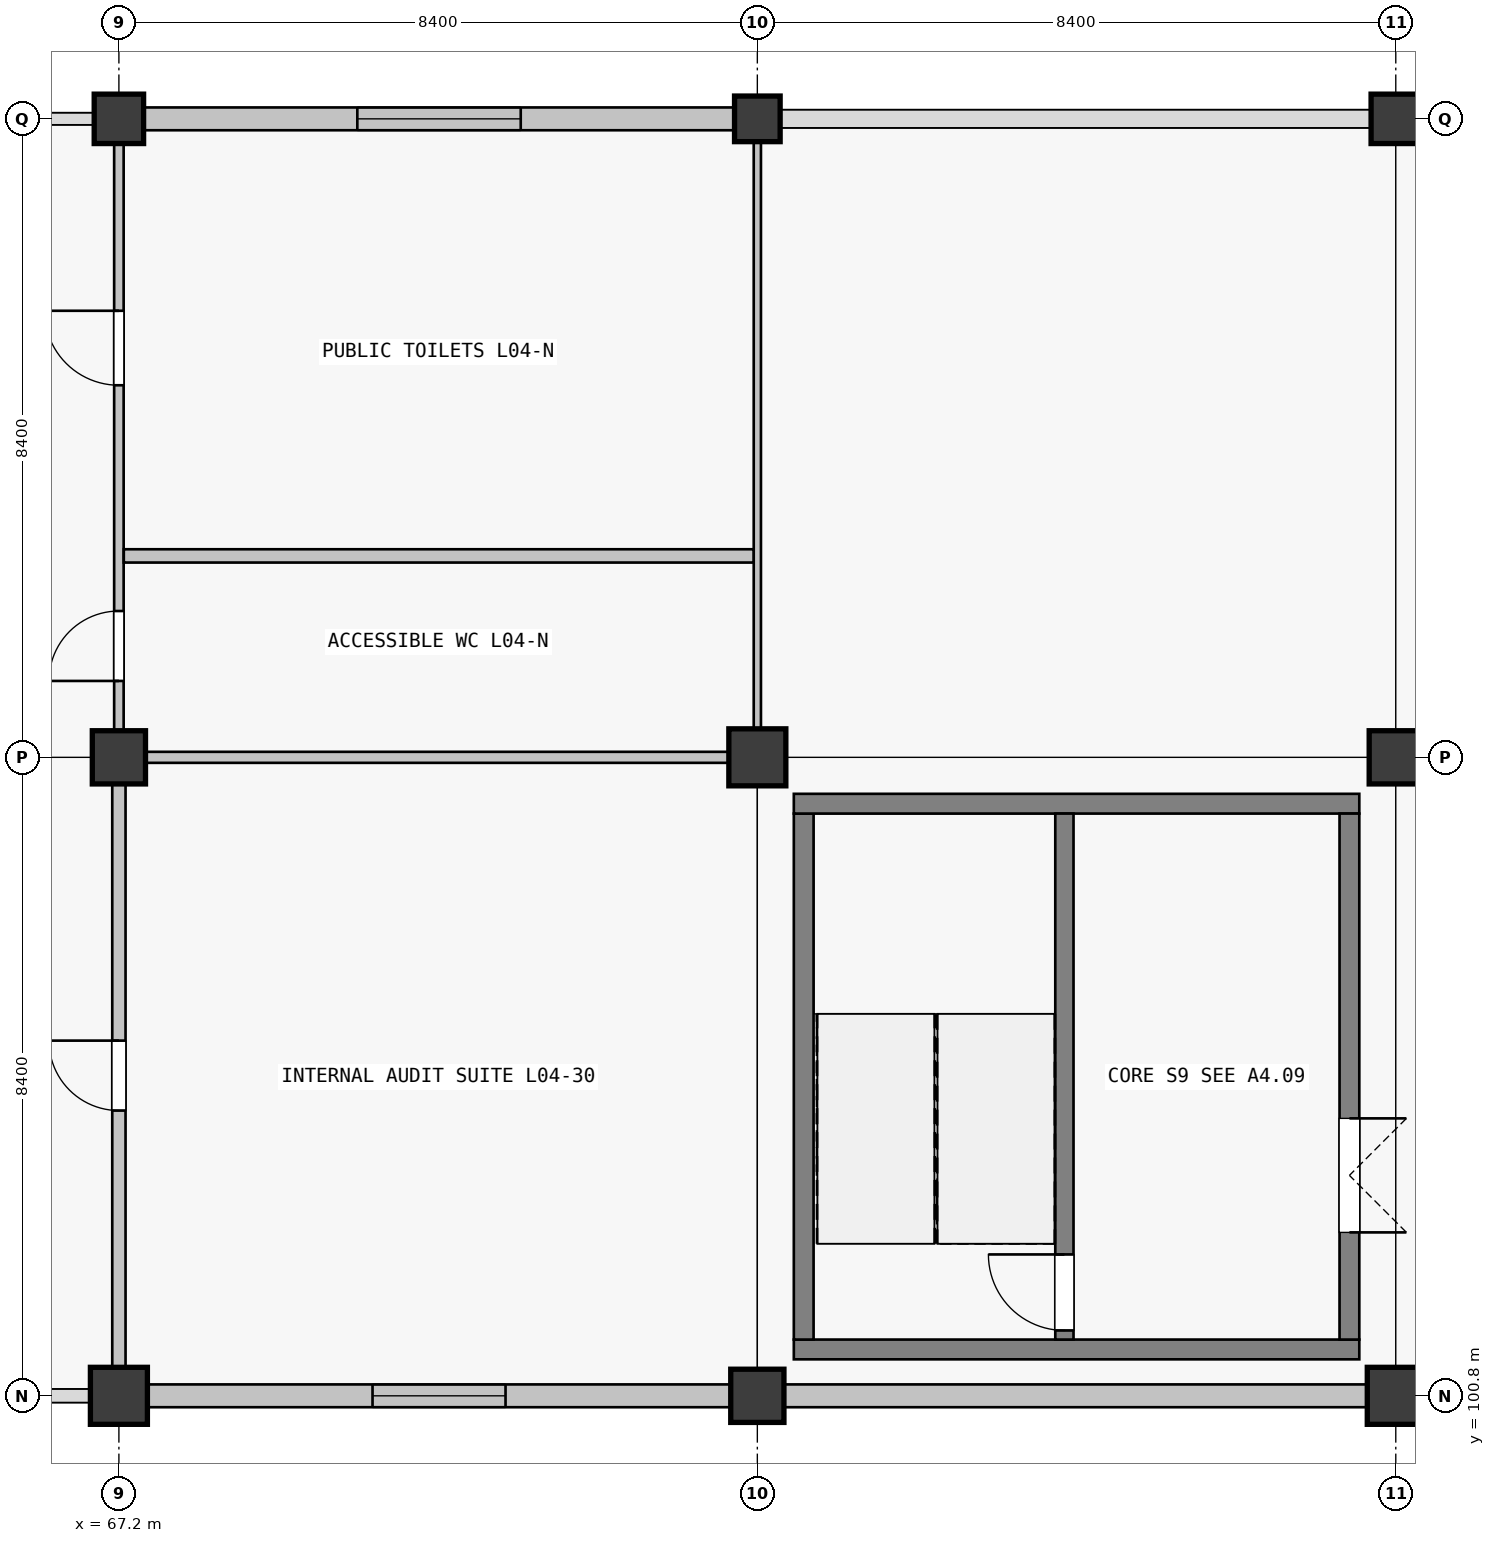
"""IFC4 building model, lengths in metres.
Left out: names, types, materials, properties, quantities, classifications, styles, units other than length and angle.
Written with IfcOpenShell. Run it as: python <this file> out.ifc"""

import sys

from ifc_helpers import new_model, si_unit, direction, frame, frame_2d, origin, origin_2d, place, context, subcontext, project, spatial, rectangle, extrude, element, fill, save


model = new_model("IFC4")
c1 = context("Model", 3, precision=1e-05, world=origin(), true_north=direction((0.0, 1.0)))
c2 = subcontext(c1, "Body", "Model", "MODEL_VIEW")
j1 = project(units=[si_unit("LENGTHUNIT", "METRE"), si_unit("PLANEANGLEUNIT", "RADIAN")], contexts=[c1])
p1 = place(None, origin())
s1 = spatial("IfcSite", under=j1, at=p1, CompositionType="ELEMENT")
p2 = place(p1, origin())
s2 = spatial("IfcBuilding", under=s1, at=p2, CompositionType="ELEMENT")
p3 = place(p2, frame((0.0, 0.0, 19.08)))
s3 = spatial("IfcBuildingStorey", under=s2, at=p3, CompositionType="ELEMENT", Elevation=19.08)
p4 = place(p3, frame((67.2, 100.8, 0.0), z_axis=(0.0, 0.0, 1.0), x_axis=(1.0, 0.0, 0.0)))
e1 = element("IfcColumn", 1, at=p4, inside=s3, PredefinedType="COLUMN", context=c2, shape_type="SweptSolid", body=[
    extrude(rectangle(XDim=0.75, YDim=0.75, at=origin_2d()), origin(), (0.0, 0.0, 1.0), 4.32),
])
p5 = place(p3, frame((67.2, 109.2, 0.0), z_axis=(0.0, 0.0, 1.0), x_axis=(1.0, 0.0, 0.0)))
e2 = element("IfcColumn", 2, at=p5, inside=s3, PredefinedType="COLUMN", context=c2, shape_type="SweptSolid", body=[
    extrude(rectangle(XDim=0.7, YDim=0.7, at=origin_2d()), origin(), (0.0, 0.0, 1.0), 4.32),
])
p6 = place(p3, frame((67.2, 117.6, 0.0), z_axis=(0.0, 0.0, 1.0), x_axis=(1.0, 0.0, 0.0)))
e3 = element("IfcColumn", 3, at=p6, inside=s3, PredefinedType="COLUMN", context=c2, shape_type="SweptSolid", body=[
    extrude(rectangle(XDim=0.65, YDim=0.65, at=origin_2d()), origin(), (0.0, 0.0, 1.0), 4.32),
])
p7 = place(p3, frame((75.6, 100.8, 0.0), z_axis=(0.0, 0.0, 1.0), x_axis=(1.0, 0.0, 0.0)))
e4 = element("IfcColumn", 4, at=p7, inside=s3, PredefinedType="COLUMN", context=c2, shape_type="SweptSolid", body=[
    extrude(rectangle(XDim=0.7, YDim=0.7, at=origin_2d()), origin(), (0.0, 0.0, 1.0), 4.32),
])
p8 = place(p3, frame((75.6, 109.2, 0.0), z_axis=(0.0, 0.0, 1.0), x_axis=(1.0, 0.0, 0.0)))
e5 = element("IfcColumn", 5, at=p8, inside=s3, PredefinedType="COLUMN", context=c2, shape_type="SweptSolid", body=[
    extrude(rectangle(XDim=0.75, YDim=0.75, at=origin_2d()), origin(), (0.0, 0.0, 1.0), 4.32),
])
p9 = place(p3, frame((75.6, 117.6, 0.0), z_axis=(0.0, 0.0, 1.0), x_axis=(1.0, 0.0, 0.0)))
e6 = element("IfcColumn", 6, at=p9, inside=s3, PredefinedType="COLUMN", context=c2, shape_type="SweptSolid", body=[
    extrude(rectangle(XDim=0.6, YDim=0.6, at=origin_2d()), origin(), (0.0, 0.0, 1.0), 4.32),
])
p10 = place(p3, frame((84.0, 100.8, 0.0), z_axis=(0.0, 0.0, 1.0), x_axis=(1.0, 0.0, 0.0)))
e7 = element("IfcColumn", 7, at=p10, inside=s3, PredefinedType="COLUMN", context=c2, shape_type="SweptSolid", body=[
    extrude(rectangle(XDim=0.75, YDim=0.75, at=origin_2d()), origin(), (0.0, 0.0, 1.0), 4.32),
])
p11 = place(p3, frame((84.0, 109.2, 0.0), z_axis=(0.0, 0.0, 1.0), x_axis=(1.0, 0.0, 0.0)))
e8 = element("IfcColumn", 8, at=p11, inside=s3, PredefinedType="COLUMN", context=c2, shape_type="SweptSolid", body=[
    extrude(rectangle(XDim=0.7, YDim=0.7, at=origin_2d()), origin(), (0.0, 0.0, 1.0), 4.32),
])
p12 = place(p3, frame((84.0, 117.6, 0.0), z_axis=(0.0, 0.0, 1.0), x_axis=(1.0, 0.0, 0.0)))
e9 = element("IfcColumn", 9, at=p12, inside=s3, PredefinedType="COLUMN", context=c2, shape_type="SweptSolid", body=[
    extrude(rectangle(XDim=0.65, YDim=0.65, at=origin_2d()), origin(), (0.0, 0.0, 1.0), 4.32),
])
p13 = place(p3, frame((75.249, 100.8, 0.0), z_axis=(0.0, 0.0, 1.0), x_axis=(-1.0, 0.0, 0.0)))
e10 = element("IfcWall", 10, at=p13, inside=s3, PredefinedType="SOLIDWALL", context=c2, shape_type="SweptSolid", body=[
    extrude(rectangle(XDim=7.673, YDim=0.3, at=frame_2d((3.836, 0.0))), origin(), (0.0, 0.0, 1.0), 3.37),
])
p14 = place(p13, frame((2.962, 0.0, 0.9)))
e11 = element("IfcOpeningElement", 11, at=p14, cuts=e10, PredefinedType="OPENING", context=c2, shape_type="SweptSolid", body=[
    extrude(rectangle(XDim=1.75, YDim=1.95, at=frame_2d((0.875, 0.975))), frame((0.0, 0.15, 0.0), z_axis=(0.0, -1.0, 0.0), x_axis=(1.0, 0.0, 0.0)), (0.0, 0.0, 1.0), 0.3),
])
p15 = place(p3, frame((67.526, 117.6, 0.0), z_axis=(0.0, 0.0, 1.0), x_axis=(1.0, 0.0, 0.0)))
e12 = element("IfcWall", 12, at=p15, inside=s3, PredefinedType="SOLIDWALL", context=c2, shape_type="SweptSolid", body=[
    extrude(rectangle(XDim=7.773, YDim=0.3, at=frame_2d((3.887, 0.0))), origin(), (0.0, 0.0, 1.0), 3.37),
])
p16 = place(p15, frame((2.811, 0.0, 0.9)))
e13 = element("IfcOpeningElement", 13, at=p16, cuts=e12, PredefinedType="OPENING", context=c2, shape_type="SweptSolid", body=[
    extrude(rectangle(XDim=2.15, YDim=1.95, at=frame_2d((1.075, 0.975))), frame((0.0, 0.15, 0.0), z_axis=(0.0, -1.0, 0.0), x_axis=(1.0, 0.0, 0.0)), (0.0, 0.0, 1.0), 0.3),
])
p17 = place(p3, frame((83.624, 100.8, 0.0), z_axis=(0.0, 0.0, 1.0), x_axis=(-1.0, 0.0, 0.0)))
e14 = element("IfcWall", 14, at=p17, inside=s3, PredefinedType="SOLIDWALL", context=c2, shape_type="SweptSolid", body=[
    extrude(rectangle(XDim=7.673, YDim=0.3, at=frame_2d((3.836, 0.0))), origin(), (0.0, 0.0, 1.0), 3.37),
])
p18 = place(p3, frame((83.52, 101.41, 0.0), z_axis=(0.0, 0.0, 1.0), x_axis=(-1.0, 0.0, 0.0)))
e15 = element("IfcWall", 15, at=p18, inside=s3, PredefinedType="SHEAR", context=c2, shape_type="SweptSolid", body=[
    extrude(rectangle(XDim=7.44, YDim=0.26, at=frame_2d((3.72, 0.0))), origin(), (0.0, 0.0, 1.0), 4.32),
])
p19 = place(p3, frame((76.21, 101.54, 0.0), z_axis=(0.0, 0.0, 1.0), x_axis=(0.0, 1.0, 0.0)))
e16 = element("IfcWall", 16, at=p19, inside=s3, PredefinedType="SHEAR", context=c2, shape_type="SweptSolid", body=[
    extrude(rectangle(XDim=6.92, YDim=0.26, at=frame_2d((3.46, 0.0))), origin(), (0.0, 0.0, 1.0), 4.32),
])
p20 = place(p3, frame((76.08, 108.59, 0.0), z_axis=(0.0, 0.0, 1.0), x_axis=(1.0, 0.0, 0.0)))
e17 = element("IfcWall", 17, at=p20, inside=s3, PredefinedType="SHEAR", context=c2, shape_type="SweptSolid", body=[
    extrude(rectangle(XDim=7.44, YDim=0.26, at=frame_2d((3.72, 0.0))), origin(), (0.0, 0.0, 1.0), 4.32),
])
p21 = place(p3, frame((83.39, 108.46, 0.0), z_axis=(0.0, 0.0, 1.0), x_axis=(0.0, -1.0, 0.0)))
e18 = element("IfcWall", 18, at=p21, inside=s3, PredefinedType="SHEAR", context=c2, shape_type="SweptSolid", body=[
    extrude(rectangle(XDim=6.92, YDim=0.26, at=frame_2d((3.46, 0.0))), origin(), (0.0, 0.0, 1.0), 4.32),
])
p22 = place(p21, frame((4.01, 0.0, 0.0)))
e19 = element("IfcOpeningElement", 19, at=p22, cuts=e18, PredefinedType="OPENING", context=c2, shape_type="SweptSolid", body=[
    extrude(rectangle(XDim=1.5, YDim=2.15, at=frame_2d((0.75, 1.075))), frame((0.0, 0.13, 0.0), z_axis=(0.0, -1.0, 0.0), x_axis=(1.0, 0.0, 0.0)), (0.0, 0.0, 1.0), 0.26),
])
p23 = place(p3, frame((79.64, 101.54, 0.0), z_axis=(0.0, 0.0, 1.0), x_axis=(0.0, 1.0, 0.0)))
e20 = element("IfcWall", 20, at=p23, inside=s3, PredefinedType="SHEAR", context=c2, shape_type="SweptSolid", body=[
    extrude(rectangle(XDim=6.92, YDim=0.24, at=frame_2d((3.46, 0.0))), origin(), (0.0, 0.0, 1.0), 4.32),
])
p24 = place(p23, frame((0.12, 0.0, 0.0)))
e21 = element("IfcOpeningElement", 21, at=p24, cuts=e20, PredefinedType="OPENING", context=c2, shape_type="SweptSolid", body=[
    extrude(rectangle(XDim=1.0, YDim=2.15, at=frame_2d((0.5, 1.075))), frame((0.0, 0.12, 0.0), z_axis=(0.0, -1.0, 0.0), x_axis=(1.0, 0.0, 0.0)), (0.0, 0.0, 1.0), 0.24),
])
p25 = place(p3, frame((67.552, 109.2, 0.0), z_axis=(0.0, 0.0, 1.0), x_axis=(1.0, 0.0, 0.0)))
e22 = element("IfcWall", 22, at=p25, inside=s3, PredefinedType="PARTITIONING", context=c2, shape_type="SweptSolid", body=[
    extrude(rectangle(XDim=7.671, YDim=0.145, at=frame_2d((3.835, 0.0))), origin(), (0.0, 0.0, 1.0), 3.19),
])
p26 = place(p3, frame((67.2, 101.177, 0.0), z_axis=(0.0, 0.0, 1.0), x_axis=(0.0, 1.0, 0.0)))
e23 = element("IfcWall", 23, at=p26, inside=s3, PredefinedType="PARTITIONING", context=c2, shape_type="SweptSolid", body=[
    extrude(rectangle(XDim=7.671, YDim=0.175, at=frame_2d((3.835, 0.0))), origin(), (0.0, 0.0, 1.0), 3.19),
])
p27 = place(p26, frame((3.376, 0.0, 0.0)))
e24 = element("IfcOpeningElement", 24, at=p27, cuts=e23, PredefinedType="OPENING", context=c2, shape_type="SweptSolid", body=[
    extrude(rectangle(XDim=0.92, YDim=2.15, at=frame_2d((0.46, 1.075))), frame((0.0, 0.087, 0.0), z_axis=(0.0, -1.0, 0.0), x_axis=(1.0, 0.0, 0.0)), (0.0, 0.0, 1.0), 0.175),
])
p28 = place(p3, frame((67.2, 109.552, 0.0), z_axis=(0.0, 0.0, 1.0), x_axis=(0.0, 1.0, 0.0)))
e25 = element("IfcWall", 25, at=p28, inside=s3, PredefinedType="PARTITIONING", context=c2, shape_type="SweptSolid", body=[
    extrude(rectangle(XDim=7.721, YDim=0.125, at=frame_2d((3.86, 0.0))), origin(), (0.0, 0.0, 1.0), 3.19),
])
p29 = place(p28, frame((0.653, 0.0, 0.0)))
e26 = element("IfcOpeningElement", 26, at=p29, cuts=e25, PredefinedType="OPENING", context=c2, shape_type="SweptSolid", body=[
    extrude(rectangle(XDim=0.92, YDim=2.1, at=frame_2d((0.46, 1.05))), frame((0.0, 0.062, 0.0), z_axis=(0.0, -1.0, 0.0), x_axis=(1.0, 0.0, 0.0)), (0.0, 0.0, 1.0), 0.125),
])
p30 = place(p28, frame((4.543, 0.0, 0.0)))
e27 = element("IfcOpeningElement", 27, at=p30, cuts=e25, PredefinedType="OPENING", context=c2, shape_type="SweptSolid", body=[
    extrude(rectangle(XDim=0.98, YDim=2.08, at=frame_2d((0.49, 1.04))), frame((0.0, 0.062, 0.0), z_axis=(0.0, -1.0, 0.0), x_axis=(1.0, 0.0, 0.0)), (0.0, 0.0, 1.0), 0.125),
])
p31 = place(p3, frame((75.6, 109.577, 0.0), z_axis=(0.0, 0.0, 1.0), x_axis=(0.0, 1.0, 0.0)))
e28 = element("IfcWall", 28, at=p31, inside=s3, PredefinedType="PARTITIONING", context=c2, shape_type="SweptSolid", body=[
    extrude(rectangle(XDim=7.721, YDim=0.095, at=frame_2d((3.861, 0.0))), origin(), (0.0, 0.0, 1.0), 3.19),
])
p32 = place(p3, frame((67.264, 111.85, 0.0), z_axis=(0.0, 0.0, 1.0), x_axis=(1.0, 0.0, 0.0)))
e29 = element("IfcWall", 29, at=p32, inside=s3, PredefinedType="PARTITIONING", context=c2, shape_type="SweptSolid", body=[
    extrude(rectangle(XDim=8.286, YDim=0.175, at=frame_2d((4.143, 0.0))), origin(), (0.0, 0.0, 1.0), 3.19),
])
p33 = place(p14, origin())
e30 = element("IfcWindow", 30, at=p33, inside=s3, PartitioningType="SINGLE_PANEL", PredefinedType="WINDOW", context=c2, shape_type="SweptSolid", body=[
    extrude(rectangle(XDim=1.75, YDim=1.95, at=frame_2d((0.875, 0.975))), frame((0.0, 0.03, 0.0), z_axis=(0.0, -1.0, 0.0), x_axis=(1.0, 0.0, 0.0)), (0.0, 0.0, 1.0), 0.06),
])
fill(e11, e30)
p34 = place(p16, origin())
e31 = element("IfcWindow", 31, at=p34, inside=s3, PartitioningType="SINGLE_PANEL", PredefinedType="WINDOW", context=c2, shape_type="SweptSolid", body=[
    extrude(rectangle(XDim=2.15, YDim=1.95, at=frame_2d((1.075, 0.975))), frame((0.0, 0.03, 0.0), z_axis=(0.0, -1.0, 0.0), x_axis=(1.0, 0.0, 0.0)), (0.0, 0.0, 1.0), 0.06),
])
fill(e13, e31)
p35 = place(p24, origin())
e32 = element("IfcDoor", 32, at=p35, inside=s3, OperationType="SINGLE_SWING_RIGHT", PredefinedType="DOOR", context=c2, shape_type="SweptSolid", body=[
    extrude(rectangle(XDim=1.0, YDim=2.15, at=frame_2d((0.5, 1.075))), frame((0.0, 0.025, 0.0), z_axis=(0.0, -1.0, 0.0), x_axis=(1.0, 0.0, 0.0)), (0.0, 0.0, 1.0), 0.05),
])
fill(e21, e32)
p36 = place(p22, origin())
e33 = element("IfcDoor", 33, at=p36, inside=s3, OperationType="DOUBLE_DOOR_SINGLE_SWING", PredefinedType="DOOR", context=c2, shape_type="SweptSolid", body=[
    extrude(rectangle(XDim=1.5, YDim=2.15, at=frame_2d((0.75, 1.075))), frame((0.0, 0.025, 0.0), z_axis=(0.0, -1.0, 0.0), x_axis=(1.0, 0.0, 0.0)), (0.0, 0.0, 1.0), 0.05),
])
fill(e19, e33)
p37 = place(p29, origin())
e34 = element("IfcDoor", 34, at=p37, inside=s3, OperationType="SINGLE_SWING_LEFT", PredefinedType="DOOR", context=c2, shape_type="SweptSolid", body=[
    extrude(rectangle(XDim=0.92, YDim=2.1, at=frame_2d((0.46, 1.05))), frame((0.0, 0.025, 0.0), z_axis=(0.0, -1.0, 0.0), x_axis=(1.0, 0.0, 0.0)), (0.0, 0.0, 1.0), 0.05),
])
fill(e26, e34)
p38 = place(p30, origin())
e35 = element("IfcDoor", 35, at=p38, inside=s3, OperationType="SINGLE_SWING_RIGHT", PredefinedType="DOOR", context=c2, shape_type="SweptSolid", body=[
    extrude(rectangle(XDim=0.98, YDim=2.08, at=frame_2d((0.49, 1.04))), frame((0.0, 0.025, 0.0), z_axis=(0.0, -1.0, 0.0), x_axis=(1.0, 0.0, 0.0)), (0.0, 0.0, 1.0), 0.05),
])
fill(e27, e35)
p39 = place(p27, origin())
e36 = element("IfcDoor", 36, at=p39, inside=s3, OperationType="SINGLE_SWING_RIGHT", PredefinedType="DOOR", context=c2, shape_type="SweptSolid", body=[
    extrude(rectangle(XDim=0.92, YDim=2.15, at=frame_2d((0.46, 1.075))), frame((0.0, 0.025, 0.0), z_axis=(0.0, -1.0, 0.0), x_axis=(1.0, 0.0, 0.0)), (0.0, 0.0, 1.0), 0.05),
])
fill(e24, e36)
save(model, sys.argv[1])
